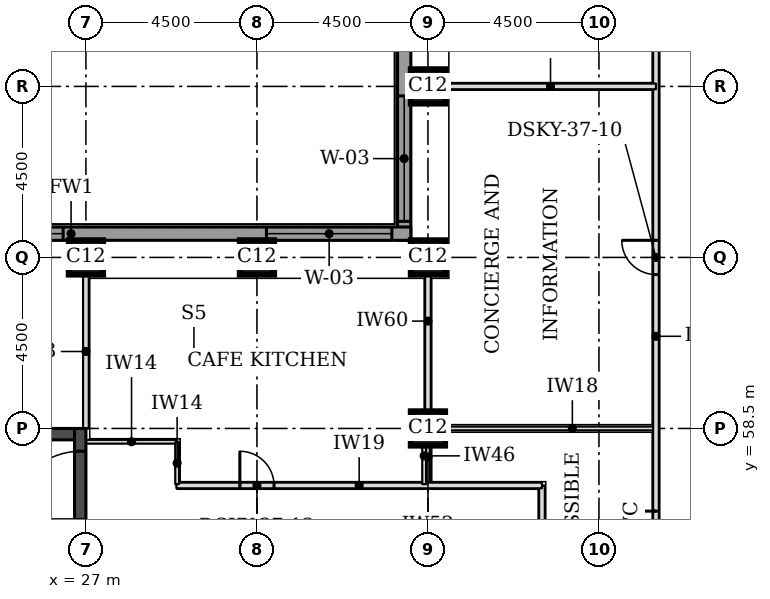
"""IFC4 building model, lengths in metres.
Left out: names, types, materials, properties, quantities, classifications, styles, units other than length and angle.
Written with IfcOpenShell. Run it as: python <this file> out.ifc"""

import sys

from ifc_helpers import new_model, si_unit, direction, frame, frame_2d, origin, origin_2d, place, context, subcontext, project, spatial, rectangle, extrude, element, fill, save


model = new_model("IFC4")
c1 = context("Model", 3, precision=1e-05, world=origin(), true_north=direction((0.0, 1.0)))
c2 = subcontext(c1, "Body", "Model", "MODEL_VIEW")
j1 = project(units=[si_unit("LENGTHUNIT", "METRE"), si_unit("PLANEANGLEUNIT", "RADIAN")], contexts=[c1])
p1 = place(None, origin())
s1 = spatial("IfcSite", under=j1, at=p1, CompositionType="ELEMENT")
p2 = place(p1, origin())
s2 = spatial("IfcBuilding", under=s1, at=p2, CompositionType="ELEMENT")
p3 = place(p2, frame((0.0, 0.0, 143.1)))
s3 = spatial("IfcBuildingStorey", under=s2, at=p3, CompositionType="ELEMENT", Elevation=143.1)
for number, where, z_axis, x_axis in (
    (1, (36.0, 58.5, 0.0), (0.0, 0.0, 1.0), (1.0, 0.0, 0.0)),
    (2, (27.0, 63.0, 0.0), (0.0, 0.0, 1.0), (1.0, 0.0, 0.0)),
    (3, (31.5, 63.0, 0.0), (0.0, 0.0, 1.0), (1.0, 0.0, 0.0)),
    (4, (36.0, 63.0, 0.0), (0.0, 0.0, 1.0), (1.0, 0.0, 0.0)),
    (5, (36.0, 67.5, 0.0), (0.0, 0.0, 1.0), (1.0, 0.0, 0.0)),
):
    element("IfcColumn", number, at=place(p3, frame(where, z_axis=z_axis, x_axis=x_axis)), inside=s3, PredefinedType="COLUMN", context=c2, shape_type="SweptSolid", body=[
        extrude(rectangle(XDim=0.9, YDim=0.9, at=origin_2d()), origin(), (0.0, 0.0, 1.0), 4.6),
    ])
p4 = place(p3, frame((18.3, 58.35, 0.0), z_axis=(0.0, 0.0, 1.0), x_axis=(1.0, 0.0, 0.0)))
e6 = element("IfcWall", 6, at=p4, inside=s3, PredefinedType="SHEAR", context=c2, shape_type="SweptSolid", body=[
    extrude(rectangle(XDim=8.4, YDim=0.3, at=frame_2d((4.2, 0.0))), origin(), (0.0, 0.0, 1.0), 4.6),
])
p5 = place(p3, frame((26.85, 49.5, 0.0), z_axis=(0.0, 0.0, 1.0), x_axis=(0.0, 1.0, 0.0)))
e7 = element("IfcWall", 7, at=p5, inside=s3, PredefinedType="SHEAR", context=c2, shape_type="SweptSolid", body=[
    extrude(rectangle(XDim=9.0, YDim=0.3, at=frame_2d((4.5, 0.0))), origin(), (0.0, 0.0, 1.0), 4.6),
])
p6 = place(p5, frame((6.6, 0.0, 0.0)))
e8 = element("IfcOpeningElement", 8, at=p6, cuts=e7, PredefinedType="OPENING", context=c2, shape_type="SweptSolid", body=[
    extrude(rectangle(XDim=1.8, YDim=2.1, at=frame_2d((0.9, 1.05))), frame((0.0, 0.16, 0.0), z_axis=(0.0, -1.0, 0.0), x_axis=(1.0, 0.0, 0.0)), (0.0, 0.0, 1.0), 0.32),
])
p7 = place(p3, frame((35.375, 76.831, 0.0), z_axis=(0.0, 0.0, 1.0), x_axis=(0.0, -1.0, 0.0)))
e9 = element("IfcWall", 9, at=p7, inside=s3, PredefinedType="STANDARD", context=c2, shape_type="SweptSolid", body=[
    extrude(rectangle(XDim=13.381, YDim=0.35, at=frame_2d((6.691, 0.0))), origin(), (0.0, 0.0, 1.0), 4.425),
])
p8 = place(p7, frame((9.581, 0.0, 0.9)))
e10 = element("IfcOpeningElement", 10, at=p8, cuts=e9, PredefinedType="OPENING", context=c2, shape_type="SweptSolid", body=[
    extrude(rectangle(XDim=3.3, YDim=2.7, at=frame_2d((1.65, 1.35))), frame((0.0, 0.185, 0.0), z_axis=(0.0, -1.0, 0.0), x_axis=(1.0, 0.0, 0.0)), (0.0, 0.0, 1.0), 0.37),
])
p9 = place(p3, frame((35.55, 63.625, 0.0), z_axis=(0.0, 0.0, 1.0), x_axis=(-1.0, 0.0, 0.0)))
e11 = element("IfcWall", 11, at=p9, inside=s3, PredefinedType="STANDARD", context=c2, shape_type="SweptSolid", body=[
    extrude(rectangle(XDim=17.881, YDim=0.35, at=frame_2d((8.941, 0.0))), origin(), (0.0, 0.0, 1.0), 4.425),
])
p10 = place(p9, frame((0.5, 0.0, 0.9)))
e12 = element("IfcOpeningElement", 12, at=p10, cuts=e11, PredefinedType="OPENING", context=c2, shape_type="SweptSolid", body=[
    extrude(rectangle(XDim=3.3, YDim=2.7, at=frame_2d((1.65, 1.35))), frame((0.0, 0.185, 0.0), z_axis=(0.0, -1.0, 0.0), x_axis=(1.0, 0.0, 0.0)), (0.0, 0.0, 1.0), 0.37),
])
p11 = place(p9, frame((9.15, 0.0, 0.9)))
e13 = element("IfcOpeningElement", 13, at=p11, cuts=e11, PredefinedType="OPENING", context=c2, shape_type="SweptSolid", body=[
    extrude(rectangle(XDim=3.3, YDim=2.7, at=frame_2d((1.65, 1.35))), frame((0.0, 0.185, 0.0), z_axis=(0.0, -1.0, 0.0), x_axis=(1.0, 0.0, 0.0)), (0.0, 0.0, 1.0), 0.37),
])
p12 = place(p3, frame((36.0, 57.0, 0.0), z_axis=(0.0, 0.0, 1.0), x_axis=(0.0, 1.0, 0.0)))
e14 = element("IfcWall", 14, at=p12, inside=s3, PredefinedType="PARTITIONING", context=c2, shape_type="SweptSolid", body=[
    extrude(rectangle(XDim=1.5, YDim=0.1, at=frame_2d((0.75, 0.0))), origin(), (0.0, 0.0, 1.0), 3.7),
])
p13 = place(p3, frame((36.0, 58.5, 0.0), z_axis=(0.0, 0.0, 1.0), x_axis=(1.0, 0.0, 0.0)))
e15 = element("IfcWall", 15, at=p13, inside=s3, PredefinedType="PARTITIONING", context=c2, shape_type="SweptSolid", body=[
    extrude(rectangle(XDim=6.0, YDim=0.1, at=frame_2d((3.0, 0.0))), origin(), (0.0, 0.0, 1.0), 4.45),
])
p14 = place(p3, frame((39.0, 53.25, 0.0), z_axis=(0.0, 0.0, 1.0), x_axis=(0.0, 1.0, 0.0)))
e16 = element("IfcWall", 16, at=p14, inside=s3, PredefinedType="PARTITIONING", context=c2, shape_type="SweptSolid", body=[
    extrude(rectangle(XDim=3.75, YDim=0.15, at=frame_2d((1.875, 0.0))), origin(), (0.0, 0.0, 1.0), 4.45),
])
p15 = place(p3, frame((42.0, 53.25, 0.0), z_axis=(0.0, 0.0, 1.0), x_axis=(0.0, 1.0, 0.0)))
e17 = element("IfcWall", 17, at=p15, inside=s3, PredefinedType="PARTITIONING", context=c2, shape_type="SweptSolid", body=[
    extrude(rectangle(XDim=21.75, YDim=0.15, at=frame_2d((10.875, 0.0))), origin(), (0.0, 0.0, 1.0), 4.45),
])
p16 = place(p15, frame((2.175, 0.0, 0.0)))
e18 = element("IfcOpeningElement", 18, at=p16, cuts=e17, PredefinedType="OPENING", context=c2, shape_type="SweptSolid", body=[
    extrude(rectangle(XDim=0.9, YDim=2.1, at=frame_2d((0.45, 1.05))), frame((0.0, 0.085, 0.0), z_axis=(0.0, -1.0, 0.0), x_axis=(1.0, 0.0, 0.0)), (0.0, 0.0, 1.0), 0.17),
])
p17 = place(p15, frame((9.3, 0.0, 0.0)))
e19 = element("IfcOpeningElement", 19, at=p17, cuts=e17, PredefinedType="OPENING", context=c2, shape_type="SweptSolid", body=[
    extrude(rectangle(XDim=0.9, YDim=2.1, at=frame_2d((0.45, 1.05))), frame((0.0, 0.085, 0.0), z_axis=(0.0, -1.0, 0.0), x_axis=(1.0, 0.0, 0.0)), (0.0, 0.0, 1.0), 0.17),
])
p18 = place(p15, frame((17.1, 0.0, 0.0)))
e20 = element("IfcOpeningElement", 20, at=p18, cuts=e17, PredefinedType="OPENING", context=c2, shape_type="SweptSolid", body=[
    extrude(rectangle(XDim=1.8, YDim=2.1, at=frame_2d((0.9, 1.05))), frame((0.0, 0.085, 0.0), z_axis=(0.0, -1.0, 0.0), x_axis=(1.0, 0.0, 0.0)), (0.0, 0.0, 1.0), 0.17),
])
p19 = place(p3, frame((29.38, 57.0, 0.0), z_axis=(0.0, 0.0, 1.0), x_axis=(1.0, 0.0, 0.0)))
e21 = element("IfcWall", 21, at=p19, inside=s3, PredefinedType="PARTITIONING", context=c2, shape_type="SweptSolid", body=[
    extrude(rectangle(XDim=9.62, YDim=0.15, at=frame_2d((4.81, 0.0))), origin(), (0.0, 0.0, 1.0), 4.45),
])
p20 = place(p19, frame((1.67, 0.0, 0.0)))
e22 = element("IfcOpeningElement", 22, at=p20, cuts=e21, PredefinedType="OPENING", context=c2, shape_type="SweptSolid", body=[
    extrude(rectangle(XDim=0.9, YDim=2.1, at=frame_2d((0.45, 1.05))), frame((0.0, 0.085, 0.0), z_axis=(0.0, -1.0, 0.0), x_axis=(1.0, 0.0, 0.0)), (0.0, 0.0, 1.0), 0.17),
])
p21 = place(p3, frame((27.0, 58.5, 0.0), z_axis=(0.0, 0.0, 1.0), x_axis=(0.0, 1.0, 0.0)))
e23 = element("IfcWall", 23, at=p21, inside=s3, PredefinedType="PARTITIONING", context=c2, shape_type="SweptSolid", body=[
    extrude(rectangle(XDim=4.05, YDim=0.15, at=frame_2d((2.025, 0.0))), origin(), (0.0, 0.0, 1.0), 4.45),
])
p22 = place(p3, frame((36.0, 58.5, 0.0), z_axis=(0.0, 0.0, 1.0), x_axis=(0.0, 1.0, 0.0)))
e24 = element("IfcWall", 24, at=p22, inside=s3, PredefinedType="PARTITIONING", context=c2, shape_type="SweptSolid", body=[
    extrude(rectangle(XDim=4.05, YDim=0.15, at=frame_2d((2.025, 0.0))), origin(), (0.0, 0.0, 1.0), 3.7),
])
p23 = place(p3, frame((36.45, 67.5, 0.0), z_axis=(0.0, 0.0, 1.0), x_axis=(1.0, 0.0, 0.0)))
e25 = element("IfcWall", 25, at=p23, inside=s3, PredefinedType="PARTITIONING", context=c2, shape_type="SweptSolid", body=[
    extrude(rectangle(XDim=5.55, YDim=0.15, at=frame_2d((2.775, 0.0))), origin(), (0.0, 0.0, 1.0), 4.45),
])
p24 = place(p3, frame((27.0, 58.15, 0.0), z_axis=(0.0, 0.0, 1.0), x_axis=(1.0, 0.0, 0.0)))
e26 = element("IfcWall", 26, at=p24, inside=s3, PredefinedType="PARTITIONING", context=c2, shape_type="SweptSolid", body=[
    extrude(rectangle(XDim=2.4, YDim=0.1, at=frame_2d((1.2, 0.0))), origin(), (0.0, 0.0, 1.0), 4.45),
])
p25 = place(p3, frame((29.4, 58.14, 0.0), z_axis=(0.0, 0.0, 1.0), x_axis=(0.0, -1.0, 0.0)))
e27 = element("IfcWall", 27, at=p25, inside=s3, PredefinedType="PARTITIONING", context=c2, shape_type="SweptSolid", body=[
    extrude(rectangle(XDim=1.105, YDim=0.1, at=frame_2d((0.552, 0.0))), origin(), (0.0, 0.0, 1.0), 4.45),
])
p26 = place(p3, frame((35.9, 58.523, 0.0), z_axis=(0.0, 0.0, 1.0), x_axis=(0.0, -1.0, 0.0)))
e28 = element("IfcWall", 28, at=p26, inside=s3, PredefinedType="PARTITIONING", context=c2, shape_type="SweptSolid", body=[
    extrude(rectangle(XDim=1.488, YDim=0.1, at=frame_2d((0.744, 0.0))), origin(), (0.0, 0.0, 1.0), 3.7),
])
p27 = place(p8, origin())
e29 = element("IfcWindow", 29, at=p27, inside=s3, PartitioningType="SINGLE_PANEL", PredefinedType="WINDOW", context=c2, shape_type="SweptSolid", body=[
    extrude(rectangle(XDim=3.3, YDim=2.7, at=frame_2d((1.65, 1.35))), frame((0.0, 0.085, 0.0), z_axis=(0.0, -1.0, 0.0), x_axis=(1.0, 0.0, 0.0)), (0.0, 0.0, 1.0), 0.06),
])
fill(e10, e29)
p28 = place(p10, origin())
e30 = element("IfcWindow", 30, at=p28, inside=s3, PartitioningType="SINGLE_PANEL", PredefinedType="WINDOW", context=c2, shape_type="SweptSolid", body=[
    extrude(rectangle(XDim=3.3, YDim=2.7, at=frame_2d((1.65, 1.35))), frame((0.0, 0.085, 0.0), z_axis=(0.0, -1.0, 0.0), x_axis=(1.0, 0.0, 0.0)), (0.0, 0.0, 1.0), 0.06),
])
fill(e12, e30)
p29 = place(p11, origin())
e31 = element("IfcWindow", 31, at=p29, inside=s3, PartitioningType="SINGLE_PANEL", PredefinedType="WINDOW", context=c2, shape_type="SweptSolid", body=[
    extrude(rectangle(XDim=3.3, YDim=2.7, at=frame_2d((1.65, 1.35))), frame((0.0, 0.085, 0.0), z_axis=(0.0, -1.0, 0.0), x_axis=(1.0, 0.0, 0.0)), (0.0, 0.0, 1.0), 0.06),
])
fill(e13, e31)
p30 = place(p16, origin())
e32 = element("IfcDoor", 32, at=p30, inside=s3, OperationType="SINGLE_SWING_RIGHT", PredefinedType="DOOR", context=c2, shape_type="SweptSolid", body=[
    extrude(rectangle(XDim=0.9, YDim=2.1, at=frame_2d((0.45, 1.05))), frame((0.0, 0.025, 0.0), z_axis=(0.0, -1.0, 0.0), x_axis=(1.0, 0.0, 0.0)), (0.0, 0.0, 1.0), 0.05),
])
fill(e18, e32)
p31 = place(p20, origin())
e33 = element("IfcDoor", 33, at=p31, inside=s3, OperationType="SINGLE_SWING_LEFT", PredefinedType="DOOR", context=c2, shape_type="SweptSolid", body=[
    extrude(rectangle(XDim=0.9, YDim=2.1, at=frame_2d((0.45, 1.05))), frame((0.0, 0.025, 0.0), z_axis=(0.0, -1.0, 0.0), x_axis=(1.0, 0.0, 0.0)), (0.0, 0.0, 1.0), 0.05),
])
fill(e22, e33)
p32 = place(p17, origin())
e34 = element("IfcDoor", 34, at=p32, inside=s3, OperationType="SINGLE_SWING_RIGHT", PredefinedType="DOOR", context=c2, shape_type="SweptSolid", body=[
    extrude(rectangle(XDim=0.9, YDim=2.1, at=frame_2d((0.45, 1.05))), frame((0.0, 0.025, 0.0), z_axis=(0.0, -1.0, 0.0), x_axis=(1.0, 0.0, 0.0)), (0.0, 0.0, 1.0), 0.05),
])
fill(e19, e34)
p33 = place(p6, origin())
e35 = element("IfcDoor", 35, at=p33, inside=s3, OperationType="SINGLE_SWING_LEFT", PredefinedType="DOOR", context=c2, shape_type="SweptSolid", body=[
    extrude(rectangle(XDim=1.8, YDim=2.1, at=frame_2d((0.9, 1.05))), frame((0.0, 0.025, 0.0), z_axis=(0.0, -1.0, 0.0), x_axis=(1.0, 0.0, 0.0)), (0.0, 0.0, 1.0), 0.05),
])
fill(e8, e35)
save(model, sys.argv[1])
